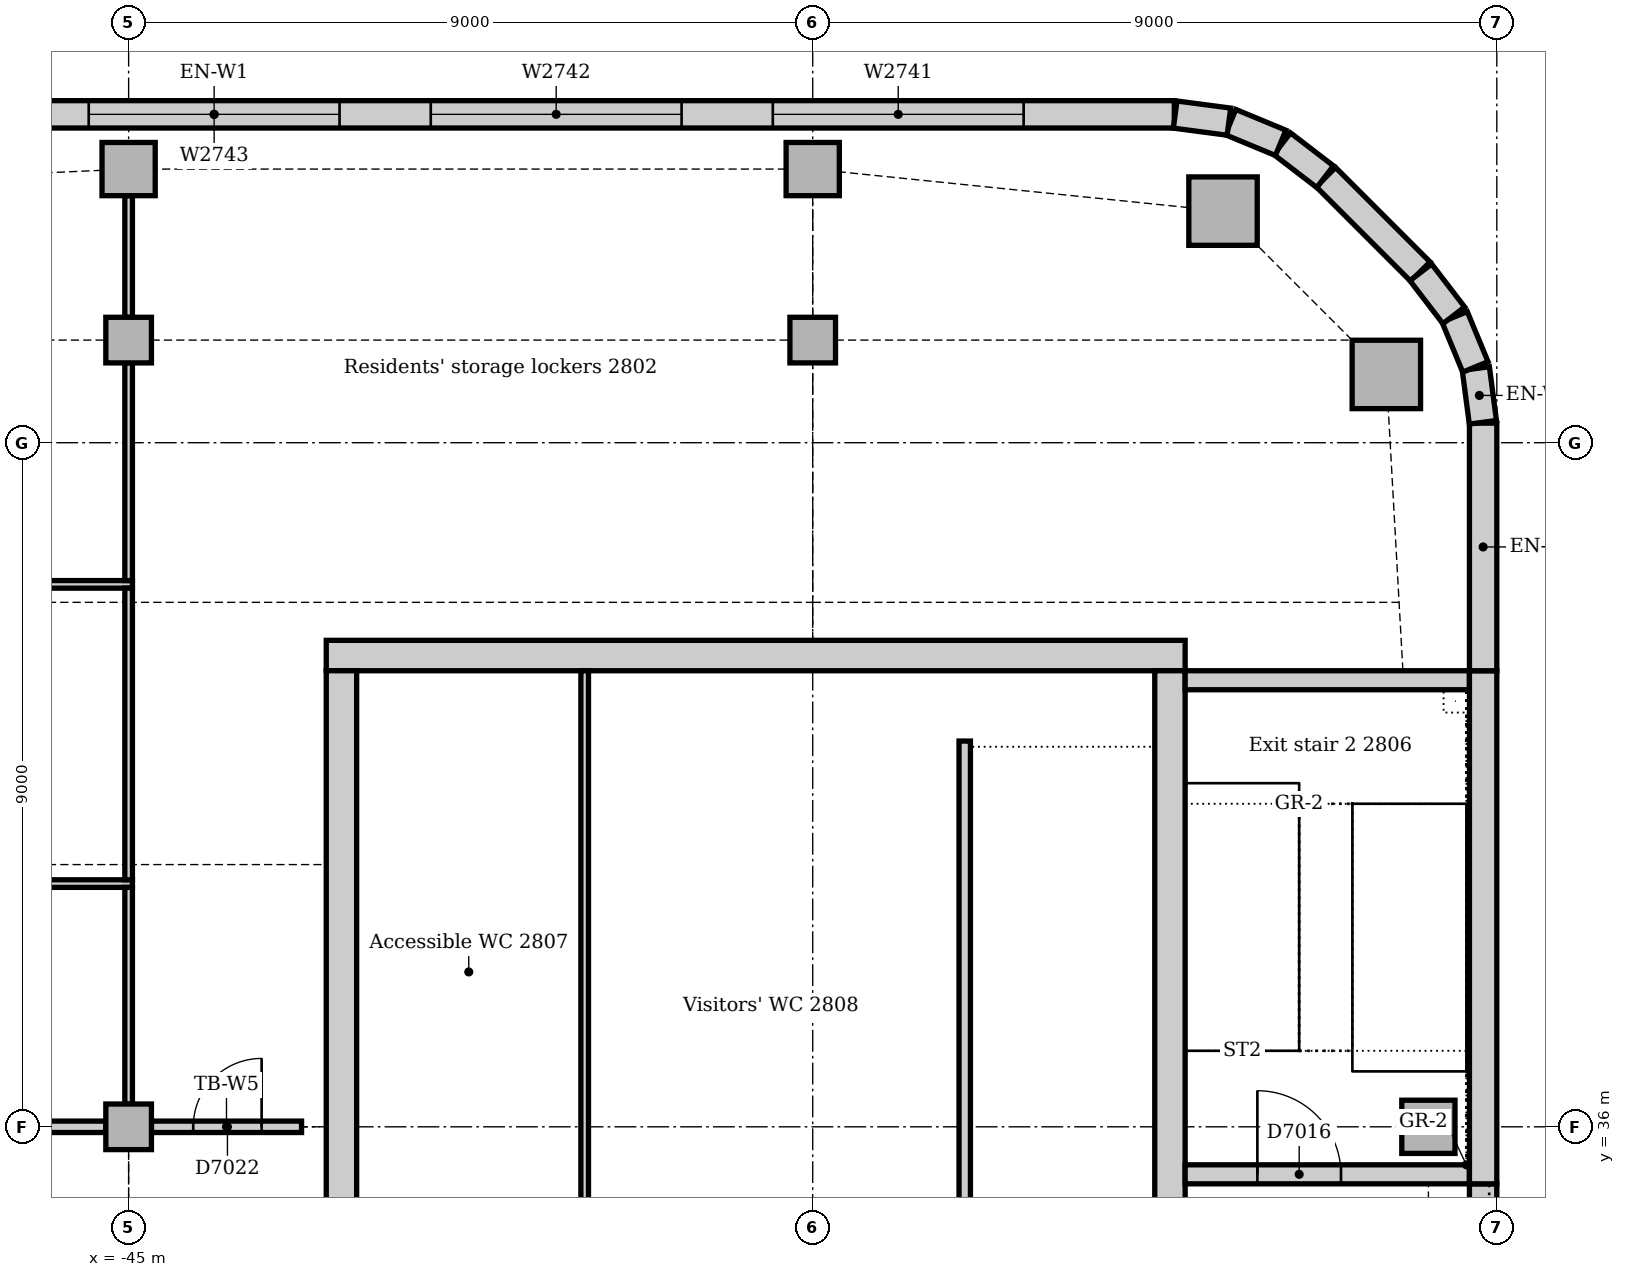
"""IFC4 building model, lengths in metres.
Left out: names, types, materials, properties, quantities, classifications, styles, units other than length and angle.
Written with IfcOpenShell. Run it as: python <this file> out.ifc"""

import sys

from ifc_helpers import new_model, si_unit, direction, frame, frame_2d, origin, origin_2d, place, context, subcontext, project, spatial, rectangle, extrude, element, fill, save


model = new_model("IFC4")
c1 = context("Model", 3, precision=1e-05, world=origin(), true_north=direction((0.0, 1.0)))
c2 = subcontext(c1, "Body", "Model", "MODEL_VIEW")
j1 = project(units=[si_unit("LENGTHUNIT", "METRE"), si_unit("PLANEANGLEUNIT", "RADIAN")], contexts=[c1])
p1 = place(None, origin())
s1 = spatial("IfcSite", under=j1, at=p1, CompositionType="ELEMENT")
p2 = place(p1, origin())
s2 = spatial("IfcBuilding", under=s1, at=p2, CompositionType="ELEMENT")
p3 = place(p2, frame((0.0, 0.0, 120.0)))
s3 = spatial("IfcBuildingStorey", under=s2, at=p3, CompositionType="ELEMENT", Elevation=120.0)
p4 = place(p3, frame((-31.1, 42.2, 0.0), z_axis=(0.0, 0.0, 1.0), x_axis=(-1.0, 0.0, 0.0)))
e1 = element("IfcWall", 1, at=p4, inside=s3, PredefinedType="SOLIDWALL", context=c2, shape_type="SweptSolid", body=[
    extrude(rectangle(XDim=11.3, YDim=0.4, at=frame_2d((5.65, 0.0))), origin(), (0.0, 0.0, 1.0), 4.0),
])
p5 = place(p3, frame((-31.3, 30.5, 0.0), z_axis=(0.0, 0.0, 1.0), x_axis=(0.0, 1.0, 0.0)))
e2 = element("IfcWall", 2, at=p5, inside=s3, PredefinedType="SOLIDWALL", context=c2, shape_type="SweptSolid", body=[
    extrude(rectangle(XDim=11.5, YDim=0.4, at=frame_2d((5.75, 0.0))), origin(), (0.0, 0.0, 1.0), 4.0),
])
p6 = place(p5, frame((0.85, 0.0, 0.0)))
e3 = element("IfcOpeningElement", 3, at=p6, cuts=e2, PredefinedType="OPENING", context=c2, shape_type="SweptSolid", body=[
    extrude(rectangle(XDim=1.8, YDim=2.1, at=frame_2d((0.9, 1.05))), frame((0.0, 0.21, 0.0), z_axis=(0.0, -1.0, 0.0), x_axis=(1.0, 0.0, 0.0)), (0.0, 0.0, 1.0), 0.42),
])
p7 = place(p3, frame((-42.2, 42.0, 0.0), z_axis=(0.0, 0.0, 1.0), x_axis=(0.0, -1.0, 0.0)))
e4 = element("IfcWall", 4, at=p7, inside=s3, PredefinedType="SOLIDWALL", context=c2, shape_type="SweptSolid", body=[
    extrude(rectangle(XDim=11.5, YDim=0.4, at=frame_2d((5.75, 0.0))), origin(), (0.0, 0.0, 1.0), 4.0),
])
p8 = place(p7, frame((8.85, 0.0, 0.0)))
e5 = element("IfcOpeningElement", 5, at=p8, cuts=e4, PredefinedType="OPENING", context=c2, shape_type="SweptSolid", body=[
    extrude(rectangle(XDim=1.8, YDim=2.1, at=frame_2d((0.9, 1.05))), frame((0.0, 0.21, 0.0), z_axis=(0.0, -1.0, 0.0), x_axis=(1.0, 0.0, 0.0)), (0.0, 0.0, 1.0), 0.42),
])
p9 = place(p3, frame((-31.1, 35.375, 0.0), z_axis=(0.0, 0.0, 1.0), x_axis=(1.0, 0.0, 0.0)))
e6 = element("IfcWall", 6, at=p9, inside=s3, PredefinedType="SOLIDWALL", context=c2, shape_type="SweptSolid", body=[
    extrude(rectangle(XDim=3.74, YDim=0.25, at=frame_2d((1.87, 0.0))), origin(), (0.0, 0.0, 1.0), 4.0),
])
p10 = place(p9, frame((0.95, 0.0, 0.0)))
e7 = element("IfcOpeningElement", 7, at=p10, cuts=e6, PredefinedType="OPENING", context=c2, shape_type="SweptSolid", body=[
    extrude(rectangle(XDim=1.1, YDim=2.1, at=frame_2d((0.55, 1.05))), frame((0.0, 0.135, 0.0), z_axis=(0.0, -1.0, 0.0), x_axis=(1.0, 0.0, 0.0)), (0.0, 0.0, 1.0), 0.27),
])
p11 = place(p3, frame((-27.36, 41.875, 0.0), z_axis=(0.0, 0.0, 1.0), x_axis=(-1.0, 0.0, 0.0)))
e8 = element("IfcWall", 8, at=p11, inside=s3, PredefinedType="SOLIDWALL", context=c2, shape_type="SweptSolid", body=[
    extrude(rectangle(XDim=3.74, YDim=0.25, at=frame_2d((1.87, 0.0))), origin(), (0.0, 0.0, 1.0), 4.0),
])
for number, where, z_axis, x_axis in (
    (9, (-28.453, 45.898, 0.0), (0.0, 0.0, 1.0), (1.0, 0.0, 0.0)),
    (10, (-30.602, 48.047, 0.0), (0.0, 0.0, 1.0), (1.0, 0.0, 0.0)),
):
    element("IfcColumn", number, at=place(p3, frame(where, z_axis=z_axis, x_axis=x_axis)), inside=s3, PredefinedType="COLUMN", context=c2, shape_type="SweptSolid", body=[
        extrude(rectangle(XDim=0.9, YDim=0.9, at=origin_2d()), origin(), (0.0, 0.0, 1.0), 3.85),
    ])
p12 = place(p3, frame((-27.9, 36.0, 0.0), z_axis=(0.0, 0.0, 1.0), x_axis=(1.0, 0.0, 0.0)))
e11 = element("IfcColumn", 11, at=p12, inside=s3, PredefinedType="COLUMN", context=c2, shape_type="SweptSolid", body=[
    extrude(rectangle(XDim=0.7, YDim=0.7, at=origin_2d()), origin(), (0.0, 0.0, 1.0), 4.0),
])
for number, where, z_axis, x_axis in (
    (12, (-45.0, 48.6, 0.0), (0.0, 0.0, 1.0), (1.0, 0.0, 0.0)),
    (13, (-36.0, 48.6, 0.0), (0.0, 0.0, 1.0), (1.0, 0.0, 0.0)),
):
    element("IfcColumn", number, at=place(p3, frame(where, z_axis=z_axis, x_axis=x_axis)), inside=s3, PredefinedType="COLUMN", context=c2, shape_type="SweptSolid", body=[
        extrude(rectangle(XDim=0.7, YDim=0.7, at=origin_2d()), origin(), (0.0, 0.0, 1.0), 3.85),
    ])
for number, where, z_axis, x_axis in (
    (14, (-45.0, 36.0, 0.0), (0.0, 0.0, 1.0), (1.0, 0.0, 0.0)),
    (15, (-45.0, 46.35, 0.0), (0.0, 0.0, 1.0), (1.0, 0.0, 0.0)),
    (16, (-36.0, 46.35, 0.0), (0.0, 0.0, 1.0), (1.0, 0.0, 0.0)),
):
    element("IfcColumn", number, at=place(p3, frame(where, z_axis=z_axis, x_axis=x_axis)), inside=s3, PredefinedType="COLUMN", context=c2, shape_type="SweptSolid", body=[
        extrude(rectangle(XDim=0.6, YDim=0.6, at=origin_2d()), origin(), (0.0, 0.0, 1.0), 3.85),
    ])
p13 = place(p3, frame((-27.18, 27.75, 0.0), z_axis=(0.0, 0.0, 1.0), x_axis=(0.0, 1.0, 0.0)))
e17 = element("IfcWall", 17, at=p13, inside=s3, PredefinedType="STANDARD", context=c2, shape_type="SweptSolid", body=[
    extrude(rectangle(XDim=7.5, YDim=0.36, at=frame_2d((3.75, 0.0))), origin(), (0.0, 0.0, 1.0), 3.85),
])
p14 = place(p13, frame((2.85, 0.0, 1.2)))
e18 = element("IfcOpeningElement", 18, at=p14, cuts=e17, PredefinedType="OPENING", context=c2, shape_type="SweptSolid", body=[
    extrude(rectangle(XDim=1.8, YDim=1.2, at=frame_2d((0.9, 0.6))), frame((0.0, 0.19, 0.0), z_axis=(0.0, -1.0, 0.0), x_axis=(1.0, 0.0, 0.0)), (0.0, 0.0, 1.0), 0.38),
])
p15 = place(p3, frame((-27.18, 35.25, 0.0), z_axis=(0.0, 0.0, 1.0), x_axis=(0.0, 1.0, 0.0)))
e19 = element("IfcWall", 19, at=p15, inside=s3, PredefinedType="STANDARD", context=c2, shape_type="SweptSolid", body=[
    extrude(rectangle(XDim=6.75, YDim=0.36, at=frame_2d((3.375, 0.0))), origin(), (0.0, 0.0, 1.0), 3.85),
])
p16 = place(p3, frame((-27.18, 42.0, 0.0), z_axis=(0.0, 0.0, 1.0), x_axis=(0.0, 1.0, 0.0)))
e20 = element("IfcWall", 20, at=p16, inside=s3, PredefinedType="STANDARD", context=c2, shape_type="SweptSolid", body=[
    extrude(rectangle(XDim=3.257, YDim=0.36, at=frame_2d((1.629, 0.0))), origin(), (0.0, 0.0, 1.0), 3.85),
])
p17 = place(p3, frame((-28.006, 47.251, 0.0), z_axis=(0.0, 0.0, 1.0), x_axis=(-0.707106781187, 0.707106781187, 0.0)))
e21 = element("IfcWall", 21, at=p17, inside=s3, PredefinedType="STANDARD", context=c2, shape_type="SweptSolid", body=[
    extrude(rectangle(XDim=1.757, YDim=0.36, at=frame_2d((0.879, 0.0))), origin(), (0.0, 0.0, 1.0), 3.85),
])
p18 = place(p3, frame((-31.243, 49.32, 0.0), z_axis=(0.0, 0.0, 1.0), x_axis=(-1.0, 0.0, 0.0)))
e22 = element("IfcWall", 22, at=p18, inside=s3, PredefinedType="STANDARD", context=c2, shape_type="SweptSolid", body=[
    extrude(rectangle(XDim=25.265, YDim=0.36, at=frame_2d((12.632, 0.0))), origin(), (0.0, 0.0, 1.0), 3.85),
])
p19 = place(p18, frame((1.982, 0.0, 0.9)))
e23 = element("IfcOpeningElement", 23, at=p19, cuts=e22, PredefinedType="OPENING", context=c2, shape_type="SweptSolid", body=[
    extrude(rectangle(XDim=3.3, YDim=1.6, at=frame_2d((1.65, 0.8))), frame((0.0, 0.19, 0.0), z_axis=(0.0, -1.0, 0.0), x_axis=(1.0, 0.0, 0.0)), (0.0, 0.0, 1.0), 0.38),
])
p20 = place(p18, frame((6.482, 0.0, 0.9)))
e24 = element("IfcOpeningElement", 24, at=p20, cuts=e22, PredefinedType="OPENING", context=c2, shape_type="SweptSolid", body=[
    extrude(rectangle(XDim=3.3, YDim=1.6, at=frame_2d((1.65, 0.8))), frame((0.0, 0.19, 0.0), z_axis=(0.0, -1.0, 0.0), x_axis=(1.0, 0.0, 0.0)), (0.0, 0.0, 1.0), 0.38),
])
p21 = place(p18, frame((10.982, 0.0, 0.9)))
e25 = element("IfcOpeningElement", 25, at=p21, cuts=e22, PredefinedType="OPENING", context=c2, shape_type="SweptSolid", body=[
    extrude(rectangle(XDim=3.3, YDim=1.6, at=frame_2d((1.65, 0.8))), frame((0.0, 0.19, 0.0), z_axis=(0.0, -1.0, 0.0), x_axis=(1.0, 0.0, 0.0)), (0.0, 0.0, 1.0), 0.38),
])
p22 = place(p18, frame((15.482, 0.0, 0.9)))
e26 = element("IfcOpeningElement", 26, at=p22, cuts=e22, PredefinedType="OPENING", context=c2, shape_type="SweptSolid", body=[
    extrude(rectangle(XDim=3.3, YDim=1.6, at=frame_2d((1.65, 0.8))), frame((0.0, 0.19, 0.0), z_axis=(0.0, -1.0, 0.0), x_axis=(1.0, 0.0, 0.0)), (0.0, 0.0, 1.0), 0.38),
])
p23 = place(p18, frame((19.982, 0.0, 0.9)))
e27 = element("IfcOpeningElement", 27, at=p23, cuts=e22, PredefinedType="OPENING", context=c2, shape_type="SweptSolid", body=[
    extrude(rectangle(XDim=3.3, YDim=1.6, at=frame_2d((1.65, 0.8))), frame((0.0, 0.19, 0.0), z_axis=(0.0, -1.0, 0.0), x_axis=(1.0, 0.0, 0.0)), (0.0, 0.0, 1.0), 0.38),
])
for number, where, z_axis, x_axis in (
    (28, (-27.183, 45.269, 0.0), (0.0, 0.0, 1.0), (-0.131, 0.991, 0.0)),
    (29, (-27.282, 45.997, 0.0), (0.0, 0.0, 1.0), (-0.383, 0.924, 0.0)),
):
    element("IfcWall", number, at=place(p3, frame(where, z_axis=z_axis, x_axis=x_axis)), inside=s3, PredefinedType="STANDARD", context=c2, shape_type="SweptSolid", body=[
        extrude(rectangle(XDim=0.713, YDim=0.36, at=frame_2d((0.356, 0.0))), origin(), (0.0, 0.0, 1.0), 3.85),
    ])
for number, where, z_axis, x_axis in (
    (30, (-27.566, 46.675, 0.0), (0.0, 0.0, 1.0), (-0.609, 0.793, 0.0)),
    (31, (-29.259, 48.5, 0.0), (0.0, 0.0, 1.0), (-0.793, 0.609, 0.0)),
):
    element("IfcWall", number, at=place(p3, frame(where, z_axis=z_axis, x_axis=x_axis)), inside=s3, PredefinedType="STANDARD", context=c2, shape_type="SweptSolid", body=[
        extrude(rectangle(XDim=0.713, YDim=0.36, at=frame_2d((0.357, 0.0))), origin(), (0.0, 0.0, 1.0), 3.85),
    ])
for number, where, z_axis, x_axis in (
    (32, (-29.844, 48.945, 0.0), (0.0, 0.0, 1.0), (-0.924, 0.383, 0.0)),
    (33, (-30.524, 49.224, 0.0), (0.0, 0.0, 1.0), (-0.991, 0.131, 0.0)),
):
    element("IfcWall", number, at=place(p3, frame(where, z_axis=z_axis, x_axis=x_axis)), inside=s3, PredefinedType="STANDARD", context=c2, shape_type="SweptSolid", body=[
        extrude(rectangle(XDim=0.713, YDim=0.36, at=frame_2d((0.356, 0.0))), origin(), (0.0, 0.0, 1.0), 3.85),
    ])
p24 = place(p3, frame((-34.0, 41.075, 0.0), z_axis=(0.0, 0.0, 1.0), x_axis=(0.0, -1.0, 0.0)))
e34 = element("IfcWall", 34, at=p24, inside=s3, PredefinedType="SOLIDWALL", context=c2, shape_type="SweptSolid", body=[
    extrude(rectangle(XDim=7.0, YDim=0.15, at=frame_2d((3.5, 0.0))), origin(), (0.0, 0.0, 1.0), 4.0),
])
p25 = place(p3, frame((-39.0, 34.075, 0.0), z_axis=(0.0, 0.0, 1.0), x_axis=(0.0, 1.0, 0.0)))
e35 = element("IfcWall", 35, at=p25, inside=s3, PredefinedType="PARTITIONING", context=c2, shape_type="SweptSolid", body=[
    extrude(rectangle(XDim=7.925, YDim=0.1, at=frame_2d((3.962, 0.0))), origin(), (0.0, 0.0, 1.0), 3.85),
])
p26 = place(p3, frame((-44.7, 36.0, 0.0), z_axis=(0.0, 0.0, 1.0), x_axis=(1.0, 0.0, 0.0)))
e36 = element("IfcWall", 36, at=p26, inside=s3, PredefinedType="PARTITIONING", context=c2, shape_type="SweptSolid", body=[
    extrude(rectangle(XDim=1.975, YDim=0.15, at=frame_2d((0.988, 0.0))), origin(), (0.0, 0.0, 1.0), 3.602),
])
p27 = place(p26, frame((0.55, 0.0, 0.0)))
e37 = element("IfcOpeningElement", 37, at=p27, cuts=e36, PredefinedType="OPENING", context=c2, shape_type="SweptSolid", body=[
    extrude(rectangle(XDim=0.9, YDim=2.1, at=frame_2d((0.45, 1.05))), frame((0.0, 0.085, 0.0), z_axis=(0.0, -1.0, 0.0), x_axis=(1.0, 0.0, 0.0)), (0.0, 0.0, 1.0), 0.17),
])
p28 = place(p3, frame((-53.7, 36.0, 0.0), z_axis=(0.0, 0.0, 1.0), x_axis=(1.0, 0.0, 0.0)))
e38 = element("IfcWall", 38, at=p28, inside=s3, PredefinedType="PARTITIONING", context=c2, shape_type="SweptSolid", body=[
    extrude(rectangle(XDim=8.4, YDim=0.15, at=frame_2d((4.2, 0.0))), origin(), (0.0, 0.0, 1.0), 3.262),
])
p29 = place(p28, frame((0.3, 0.0, 0.0)))
e39 = element("IfcOpeningElement", 39, at=p29, cuts=e38, PredefinedType="OPENING", context=c2, shape_type="SweptSolid", body=[
    extrude(rectangle(XDim=1.0, YDim=2.1, at=frame_2d((0.5, 1.05))), frame((0.0, 0.085, 0.0), z_axis=(0.0, -1.0, 0.0), x_axis=(1.0, 0.0, 0.0)), (0.0, 0.0, 1.0), 0.17),
])
p30 = place(p3, frame((-60.39, 39.2, 0.0), z_axis=(0.0, 0.0, 1.0), x_axis=(1.0, 0.0, 0.0)))
e40 = element("IfcWall", 40, at=p30, inside=s3, PredefinedType="PARTITIONING", context=c2, shape_type="SweptSolid", body=[
    extrude(rectangle(XDim=15.44, YDim=0.1, at=frame_2d((7.72, 0.0))), origin(), (0.0, 0.0, 1.0), 3.85),
])
p31 = place(p30, frame((6.021, 0.0, 0.0)))
e41 = element("IfcOpeningElement", 41, at=p31, cuts=e40, PredefinedType="OPENING", context=c2, shape_type="SweptSolid", body=[
    extrude(rectangle(XDim=0.9, YDim=2.1, at=frame_2d((0.45, 1.05))), frame((0.0, 0.06, 0.0), z_axis=(0.0, -1.0, 0.0), x_axis=(1.0, 0.0, 0.0)), (0.0, 0.0, 1.0), 0.12),
])
p32 = place(p3, frame((-60.39, 43.136, 0.0), z_axis=(0.0, 0.0, 1.0), x_axis=(1.0, 0.0, 0.0)))
e42 = element("IfcWall", 42, at=p32, inside=s3, PredefinedType="PARTITIONING", context=c2, shape_type="SweptSolid", body=[
    extrude(rectangle(XDim=15.44, YDim=0.1, at=frame_2d((7.72, 0.0))), origin(), (0.0, 0.0, 1.0), 3.85),
])
p33 = place(p32, frame((4.5, 0.0, 0.0)))
e43 = element("IfcOpeningElement", 43, at=p33, cuts=e42, PredefinedType="OPENING", context=c2, shape_type="SweptSolid", body=[
    extrude(rectangle(XDim=0.9, YDim=2.1, at=frame_2d((0.45, 1.05))), frame((0.0, 0.06, 0.0), z_axis=(0.0, -1.0, 0.0), x_axis=(1.0, 0.0, 0.0)), (0.0, 0.0, 1.0), 0.12),
])
p34 = place(p32, frame((12.06, 0.0, 0.0)))
e44 = element("IfcOpeningElement", 44, at=p34, cuts=e42, PredefinedType="OPENING", context=c2, shape_type="SweptSolid", body=[
    extrude(rectangle(XDim=0.9, YDim=2.1, at=frame_2d((0.45, 1.05))), frame((0.0, 0.06, 0.0), z_axis=(0.0, -1.0, 0.0), x_axis=(1.0, 0.0, 0.0)), (0.0, 0.0, 1.0), 0.12),
])
p35 = place(p3, frame((-45.0, 43.187, 0.0), z_axis=(0.0, 0.0, 1.0), x_axis=(0.0, 1.0, 0.0)))
e45 = element("IfcWall", 45, at=p35, inside=s3, PredefinedType="PARTITIONING", context=c2, shape_type="SweptSolid", body=[
    extrude(rectangle(XDim=2.864, YDim=0.1, at=frame_2d((1.432, 0.0))), origin(), (0.0, 0.0, 1.0), 3.362),
])
p36 = place(p3, frame((-45.0, 39.25, 0.0), z_axis=(0.0, 0.0, 1.0), x_axis=(0.0, 1.0, 0.0)))
e46 = element("IfcWall", 46, at=p36, inside=s3, PredefinedType="PARTITIONING", context=c2, shape_type="SweptSolid", body=[
    extrude(rectangle(XDim=3.837, YDim=0.1, at=frame_2d((1.918, 0.0))), origin(), (0.0, 0.0, 1.0), 3.362),
])
p37 = place(p3, frame((-45.0, 36.3, 0.0), z_axis=(0.0, 0.0, 1.0), x_axis=(0.0, 1.0, 0.0)))
e47 = element("IfcWall", 47, at=p37, inside=s3, PredefinedType="PARTITIONING", context=c2, shape_type="SweptSolid", body=[
    extrude(rectangle(XDim=2.85, YDim=0.1, at=frame_2d((1.425, 0.0))), origin(), (0.0, 0.0, 1.0), 3.362),
])
p38 = place(p3, frame((-45.0, 46.65, 0.0), z_axis=(0.0, 0.0, 1.0), x_axis=(0.0, 1.0, 0.0)))
e48 = element("IfcWall", 48, at=p38, inside=s3, PredefinedType="PARTITIONING", context=c2, shape_type="SweptSolid", body=[
    extrude(rectangle(XDim=1.6, YDim=0.1, at=frame_2d((0.8, 0.0))), origin(), (0.0, 0.0, 1.0), 3.652),
])
p39 = place(p19, origin())
e49 = element("IfcWindow", 49, at=p39, inside=s3, PartitioningType="SINGLE_PANEL", PredefinedType="WINDOW", context=c2, shape_type="SweptSolid", body=[
    extrude(rectangle(XDim=3.3, YDim=1.6, at=frame_2d((1.65, 0.8))), frame((0.0, 0.13, 0.0), z_axis=(0.0, -1.0, 0.0), x_axis=(1.0, 0.0, 0.0)), (0.0, 0.0, 1.0), 0.06),
])
fill(e23, e49)
p40 = place(p20, origin())
e50 = element("IfcWindow", 50, at=p40, inside=s3, PartitioningType="SINGLE_PANEL", PredefinedType="WINDOW", context=c2, shape_type="SweptSolid", body=[
    extrude(rectangle(XDim=3.3, YDim=1.6, at=frame_2d((1.65, 0.8))), frame((0.0, 0.13, 0.0), z_axis=(0.0, -1.0, 0.0), x_axis=(1.0, 0.0, 0.0)), (0.0, 0.0, 1.0), 0.06),
])
fill(e24, e50)
p41 = place(p21, origin())
e51 = element("IfcWindow", 51, at=p41, inside=s3, PartitioningType="SINGLE_PANEL", PredefinedType="WINDOW", context=c2, shape_type="SweptSolid", body=[
    extrude(rectangle(XDim=3.3, YDim=1.6, at=frame_2d((1.65, 0.8))), frame((0.0, 0.13, 0.0), z_axis=(0.0, -1.0, 0.0), x_axis=(1.0, 0.0, 0.0)), (0.0, 0.0, 1.0), 0.06),
])
fill(e25, e51)
p42 = place(p10, origin())
e52 = element("IfcDoor", 52, at=p42, inside=s3, OperationType="SINGLE_SWING_LEFT", PredefinedType="DOOR", context=c2, shape_type="SweptSolid", body=[
    extrude(rectangle(XDim=1.1, YDim=2.1, at=frame_2d((0.55, 1.05))), frame((0.0, 0.025, 0.0), z_axis=(0.0, -1.0, 0.0), x_axis=(1.0, 0.0, 0.0)), (0.0, 0.0, 1.0), 0.05),
])
fill(e7, e52)
p43 = place(p27, origin())
e53 = element("IfcDoor", 53, at=p43, inside=s3, OperationType="SINGLE_SWING_RIGHT", PredefinedType="DOOR", context=c2, shape_type="SweptSolid", body=[
    extrude(rectangle(XDim=0.9, YDim=2.1, at=frame_2d((0.45, 1.05))), frame((0.0, 0.025, 0.0), z_axis=(0.0, -1.0, 0.0), x_axis=(1.0, 0.0, 0.0)), (0.0, 0.0, 1.0), 0.05),
])
fill(e37, e53)
save(model, sys.argv[1])
